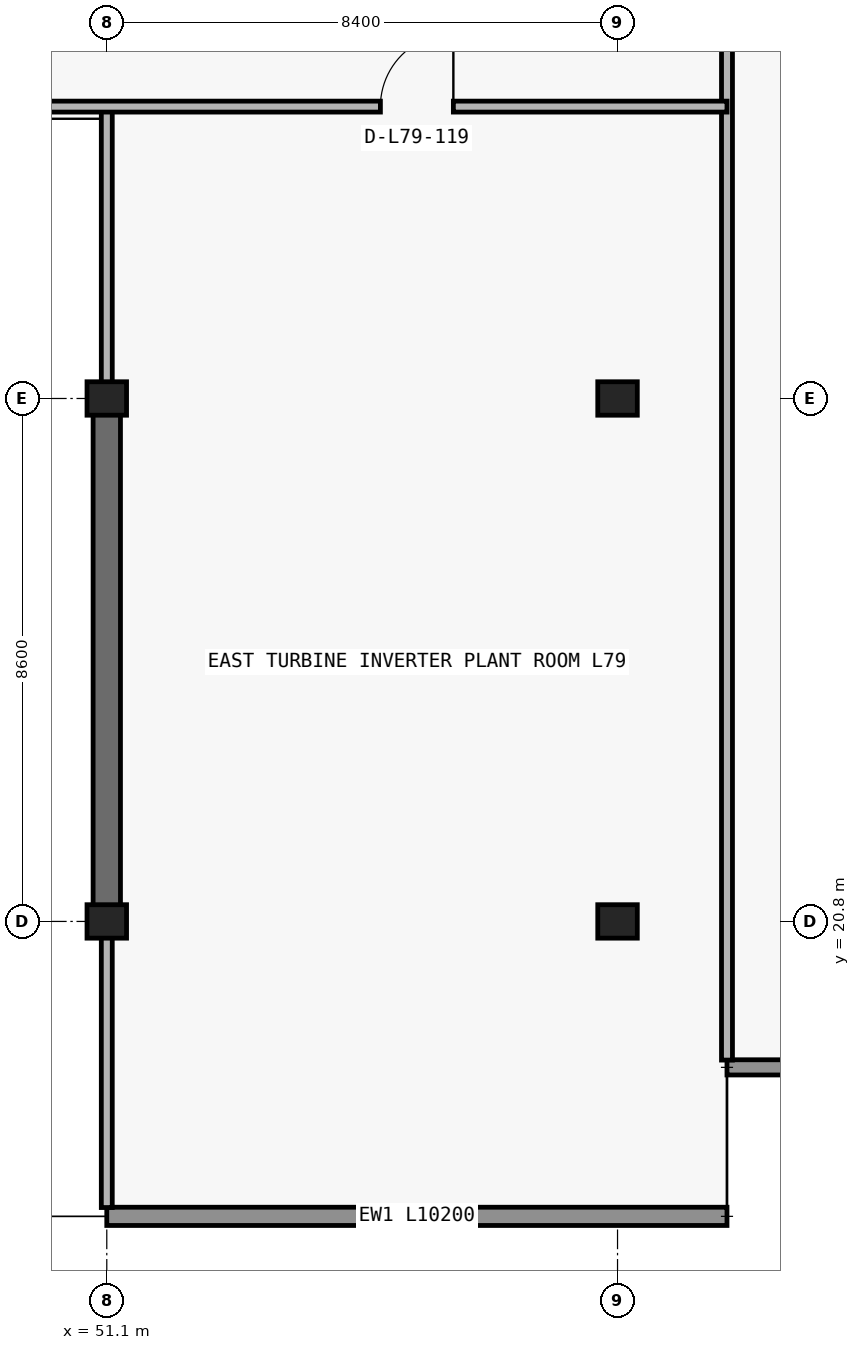
"""IFC4 building model, lengths in metres.
Left out: names, types, materials, properties, quantities, classifications, styles, units other than length and angle.
Written with IfcOpenShell. Run it as: python <this file> out.ifc"""

import sys

from ifc_helpers import new_model, si_unit, direction, frame, frame_2d, origin, origin_2d, place, context, subcontext, project, spatial, rectangle, extrude, element, fill, save


model = new_model("IFC4")
c1 = context("Model", 3, precision=1e-05, world=origin(), true_north=direction((0.0, 1.0)))
c2 = subcontext(c1, "Body", "Model", "MODEL_VIEW")
j1 = project(units=[si_unit("LENGTHUNIT", "METRE"), si_unit("PLANEANGLEUNIT", "RADIAN")], contexts=[c1])
p1 = place(None, origin())
s1 = spatial("IfcSite", under=j1, at=p1, CompositionType="ELEMENT")
p2 = place(p1, origin())
s2 = spatial("IfcBuilding", under=s1, at=p2, CompositionType="ELEMENT")
p3 = place(p2, frame((0.0, 0.0, 284.8)))
s3 = spatial("IfcBuildingStorey", under=s2, at=p3, CompositionType="ELEMENT", Elevation=284.8)
for number, where, z_axis, x_axis in (
    (1, (51.1, 20.8, 0.0), (0.0, 0.0, 1.0), (1.0, 0.0, 0.0)),
    (2, (59.5, 20.8, 0.0), (0.0, 0.0, 1.0), (1.0, 0.0, 0.0)),
    (3, (51.1, 29.4, 0.0), (0.0, 0.0, 1.0), (1.0, 0.0, 0.0)),
    (4, (59.5, 29.4, 0.0), (0.0, 0.0, 1.0), (1.0, 0.0, 0.0)),
):
    element("IfcColumn", number, at=place(p3, frame(where, z_axis=z_axis, x_axis=x_axis)), inside=s3, PredefinedType="COLUMN", context=c2, shape_type="SweptSolid", body=[
        extrude(rectangle(XDim=0.65, YDim=0.55, at=origin_2d()), origin(), (0.0, 0.0, 1.0), 5.1),
    ])
p4 = place(p3, frame((51.1, 20.8, 0.0), z_axis=(0.0, 0.0, 1.0), x_axis=(0.0, 1.0, 0.0)))
e5 = element("IfcWall", 5, at=p4, inside=s3, PredefinedType="SHEAR", context=c2, shape_type="SweptSolid", body=[
    extrude(rectangle(XDim=8.6, YDim=0.45, at=frame_2d((4.3, 0.0))), origin(), (0.0, 0.0, 1.0), 5.1),
])
p5 = place(p3, frame((61.3, 15.95, 0.0), z_axis=(0.0, 0.0, 1.0), x_axis=(-1.0, 0.0, 0.0)))
e6 = element("IfcWall", 6, at=p5, inside=s3, PredefinedType="STANDARD", context=c2, shape_type="SweptSolid", body=[
    extrude(rectangle(XDim=10.2, YDim=0.3, at=frame_2d((5.1, 0.0))), origin(), (0.0, 0.0, 1.0), 5.1),
])
p6 = place(p3, frame((61.3, 18.4, 0.0), z_axis=(0.0, 0.0, 1.0), x_axis=(1.0, 0.0, 0.0)))
e7 = element("IfcWall", 7, at=p6, inside=s3, PredefinedType="ELEMENTEDWALL", context=c2, shape_type="SweptSolid", body=[
    extrude(rectangle(XDim=2.65, YDim=0.25, at=frame_2d((1.325, 0.0))), origin(), (0.0, 0.0, 1.0), 5.1),
])
p7 = place(p3, frame((51.1, 16.095, 0.0), z_axis=(0.0, 0.0, 1.0), x_axis=(0.0, 1.0, 0.0)))
e8 = element("IfcWall", 8, at=p7, inside=s3, PredefinedType="PARTITIONING", context=c2, shape_type="SweptSolid", body=[
    extrude(rectangle(XDim=4.7, YDim=0.18, at=frame_2d((2.35, 0.0))), origin(), (0.0, 0.0, 1.0), 5.1),
])
p8 = place(p3, frame((51.1, 29.405, 0.0), z_axis=(0.0, 0.0, 1.0), x_axis=(0.0, 1.0, 0.0)))
e9 = element("IfcWall", 9, at=p8, inside=s3, PredefinedType="PARTITIONING", context=c2, shape_type="SweptSolid", body=[
    extrude(rectangle(XDim=4.795, YDim=0.18, at=frame_2d((2.397, 0.0))), origin(), (0.0, 0.0, 1.0), 4.385),
])
p9 = place(p3, frame((61.3, 18.52, 0.0), z_axis=(0.0, 0.0, 1.0), x_axis=(0.0, 1.0, 0.0)))
e10 = element("IfcWall", 10, at=p9, inside=s3, PredefinedType="PARTITIONING", context=c2, shape_type="SweptSolid", body=[
    extrude(rectangle(XDim=18.48, YDim=0.18, at=frame_2d((9.24, 0.0))), origin(), (0.0, 0.0, 1.0), 5.1),
])
p10 = place(p3, frame((16.5, 34.2, 0.0), z_axis=(0.0, 0.0, 1.0), x_axis=(1.0, 0.0, 0.0)))
e11 = element("IfcWall", 11, at=p10, inside=s3, PredefinedType="PARTITIONING", context=c2, shape_type="SweptSolid", body=[
    extrude(rectangle(XDim=44.8, YDim=0.18, at=frame_2d((22.4, 0.0))), origin(), (0.0, 0.0, 1.0), 5.1),
])
p11 = place(p10, frame((4.5, 0.0, 0.0)))
e12 = element("IfcOpeningElement", 12, at=p11, cuts=e11, PredefinedType="OPENING", context=c2, shape_type="SweptSolid", body=[
    extrude(rectangle(XDim=1.2, YDim=2.2, at=frame_2d((0.6, 1.1))), frame((0.0, 0.1, 0.0), z_axis=(0.0, -1.0, 0.0), x_axis=(1.0, 0.0, 0.0)), (0.0, 0.0, 1.0), 0.2),
])
p12 = place(p10, frame((39.1, 0.0, 0.0)))
e13 = element("IfcOpeningElement", 13, at=p12, cuts=e11, PredefinedType="OPENING", context=c2, shape_type="SweptSolid", body=[
    extrude(rectangle(XDim=1.2, YDim=2.2, at=frame_2d((0.6, 1.1))), frame((0.0, 0.1, 0.0), z_axis=(0.0, -1.0, 0.0), x_axis=(1.0, 0.0, 0.0)), (0.0, 0.0, 1.0), 0.2),
])
p13 = place(p12, origin())
e14 = element("IfcDoor", 14, at=p13, inside=s3, OperationType="SINGLE_SWING_RIGHT", PredefinedType="DOOR", context=c2, shape_type="SweptSolid", body=[
    extrude(rectangle(XDim=1.2, YDim=2.2, at=frame_2d((0.6, 1.1))), frame((0.0, 0.025, 0.0), z_axis=(0.0, -1.0, 0.0), x_axis=(1.0, 0.0, 0.0)), (0.0, 0.0, 1.0), 0.05),
])
fill(e13, e14)
save(model, sys.argv[1])
